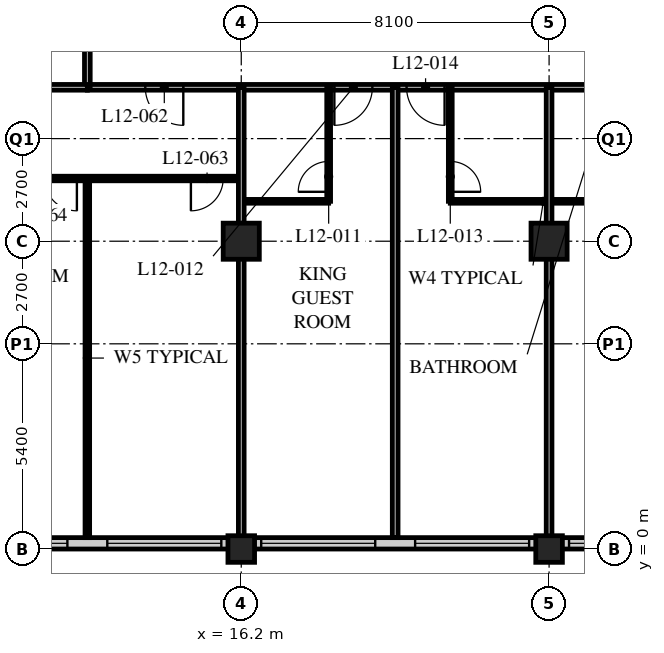
"""IFC4 building model, lengths in metres.
Left out: names, types, materials, properties, quantities, classifications, styles, units other than length and angle.
Written with IfcOpenShell. Run it as: python <this file> out.ifc"""

import sys

from ifc_helpers import new_model, si_unit, direction, frame, frame_2d, origin, origin_2d, place, context, subcontext, project, spatial, rectangle, hollow_rectangle, extrude, element, fill, save


model = new_model("IFC4")
c1 = context("Model", 3, precision=1e-05, world=origin(), true_north=direction((0.0, 1.0)))
c2 = subcontext(c1, "Body", "Model", "MODEL_VIEW")
j1 = project(units=[si_unit("LENGTHUNIT", "METRE"), si_unit("PLANEANGLEUNIT", "RADIAN")], contexts=[c1])
p1 = place(None, origin())
s1 = spatial("IfcSite", under=j1, at=p1, CompositionType="ELEMENT")
p2 = place(p1, origin())
s2 = spatial("IfcBuilding", under=s1, at=p2, CompositionType="ELEMENT")
p3 = place(p2, frame((0.0, 0.0, 53.4)))
s3 = spatial("IfcBuildingStorey", under=s2, at=p3, CompositionType="ELEMENT", Elevation=53.4)
p4 = place(p3, frame((16.2, 0.0, 0.0), z_axis=(0.0, 0.0, 1.0), x_axis=(1.0, 0.0, 0.0)))
e1 = element("IfcColumn", 1, at=p4, inside=s3, PredefinedType="COLUMN", context=c2, shape_type="SweptSolid", body=[
    extrude(hollow_rectangle(XDim=0.7, YDim=0.7, WallThickness=0.06, at=origin_2d()), origin(), (0.0, 0.0, 1.0), 3.4),
])
p5 = place(p3, frame((16.2, 8.1, 0.0), z_axis=(0.0, 0.0, 1.0), x_axis=(1.0, 0.0, 0.0)))
e2 = element("IfcColumn", 2, at=p5, inside=s3, PredefinedType="COLUMN", context=c2, shape_type="SweptSolid", body=[
    extrude(hollow_rectangle(XDim=0.95, YDim=0.95, WallThickness=0.095, at=origin_2d()), origin(), (0.0, 0.0, 1.0), 3.4),
])
p6 = place(p3, frame((24.3, 0.0, 0.0), z_axis=(0.0, 0.0, 1.0), x_axis=(1.0, 0.0, 0.0)))
e3 = element("IfcColumn", 3, at=p6, inside=s3, PredefinedType="COLUMN", context=c2, shape_type="SweptSolid", body=[
    extrude(hollow_rectangle(XDim=0.7, YDim=0.7, WallThickness=0.06, at=origin_2d()), origin(), (0.0, 0.0, 1.0), 3.4),
])
p7 = place(p3, frame((24.3, 8.1, 0.0), z_axis=(0.0, 0.0, 1.0), x_axis=(1.0, 0.0, 0.0)))
e4 = element("IfcColumn", 4, at=p7, inside=s3, PredefinedType="COLUMN", context=c2, shape_type="SweptSolid", body=[
    extrude(hollow_rectangle(XDim=0.95, YDim=0.95, WallThickness=0.095, at=origin_2d()), origin(), (0.0, 0.0, 1.0), 3.4),
])
p8 = place(p3, frame((8.4, 0.15, 0.0), z_axis=(0.0, 0.0, 1.0), x_axis=(1.0, 0.0, 0.0)))
e5 = element("IfcWall", 5, at=p8, inside=s3, PredefinedType="SOLIDWALL", context=c2, shape_type="SweptSolid", body=[
    extrude(rectangle(XDim=40.2, YDim=0.3, at=frame_2d((20.1, 0.0))), origin(), (0.0, 0.0, 1.0), 3.19),
])
p9 = place(p8, frame((0.225, 0.0, 0.9)))
e6 = element("IfcOpeningElement", 6, at=p9, cuts=e5, PredefinedType="OPENING", context=c2, shape_type="SweptSolid", body=[
    extrude(rectangle(XDim=3.0, YDim=2.0, at=frame_2d((1.5, 1.0))), frame((0.0, 0.16, 0.0), z_axis=(0.0, -1.0, 0.0), x_axis=(1.0, 0.0, 0.0)), (0.0, 0.0, 1.0), 0.32),
])
p10 = place(p8, frame((4.275, 0.0, 0.9)))
e7 = element("IfcOpeningElement", 7, at=p10, cuts=e5, PredefinedType="OPENING", context=c2, shape_type="SweptSolid", body=[
    extrude(rectangle(XDim=3.0, YDim=2.0, at=frame_2d((1.5, 1.0))), frame((0.0, 0.16, 0.0), z_axis=(0.0, -1.0, 0.0), x_axis=(1.0, 0.0, 0.0)), (0.0, 0.0, 1.0), 0.32),
])
p11 = place(p8, frame((8.325, 0.0, 0.9)))
e8 = element("IfcOpeningElement", 8, at=p11, cuts=e5, PredefinedType="OPENING", context=c2, shape_type="SweptSolid", body=[
    extrude(rectangle(XDim=3.0, YDim=2.0, at=frame_2d((1.5, 1.0))), frame((0.0, 0.16, 0.0), z_axis=(0.0, -1.0, 0.0), x_axis=(1.0, 0.0, 0.0)), (0.0, 0.0, 1.0), 0.32),
])
p12 = place(p8, frame((12.375, 0.0, 0.9)))
e9 = element("IfcOpeningElement", 9, at=p12, cuts=e5, PredefinedType="OPENING", context=c2, shape_type="SweptSolid", body=[
    extrude(rectangle(XDim=3.0, YDim=2.0, at=frame_2d((1.5, 1.0))), frame((0.0, 0.16, 0.0), z_axis=(0.0, -1.0, 0.0), x_axis=(1.0, 0.0, 0.0)), (0.0, 0.0, 1.0), 0.32),
])
p13 = place(p8, frame((16.425, 0.0, 0.9)))
e10 = element("IfcOpeningElement", 10, at=p13, cuts=e5, PredefinedType="OPENING", context=c2, shape_type="SweptSolid", body=[
    extrude(rectangle(XDim=3.0, YDim=2.0, at=frame_2d((1.5, 1.0))), frame((0.0, 0.16, 0.0), z_axis=(0.0, -1.0, 0.0), x_axis=(1.0, 0.0, 0.0)), (0.0, 0.0, 1.0), 0.32),
])
p14 = place(p8, frame((20.475, 0.0, 0.9)))
e11 = element("IfcOpeningElement", 11, at=p14, cuts=e5, PredefinedType="OPENING", context=c2, shape_type="SweptSolid", body=[
    extrude(rectangle(XDim=3.0, YDim=2.0, at=frame_2d((1.5, 1.0))), frame((0.0, 0.16, 0.0), z_axis=(0.0, -1.0, 0.0), x_axis=(1.0, 0.0, 0.0)), (0.0, 0.0, 1.0), 0.32),
])
p15 = place(p8, frame((24.525, 0.0, 0.9)))
e12 = element("IfcOpeningElement", 12, at=p15, cuts=e5, PredefinedType="OPENING", context=c2, shape_type="SweptSolid", body=[
    extrude(rectangle(XDim=3.0, YDim=2.0, at=frame_2d((1.5, 1.0))), frame((0.0, 0.16, 0.0), z_axis=(0.0, -1.0, 0.0), x_axis=(1.0, 0.0, 0.0)), (0.0, 0.0, 1.0), 0.32),
])
p16 = place(p8, frame((28.575, 0.0, 0.9)))
e13 = element("IfcOpeningElement", 13, at=p16, cuts=e5, PredefinedType="OPENING", context=c2, shape_type="SweptSolid", body=[
    extrude(rectangle(XDim=3.0, YDim=2.0, at=frame_2d((1.5, 1.0))), frame((0.0, 0.16, 0.0), z_axis=(0.0, -1.0, 0.0), x_axis=(1.0, 0.0, 0.0)), (0.0, 0.0, 1.0), 0.32),
])
p17 = place(p8, frame((32.625, 0.0, 0.9)))
e14 = element("IfcOpeningElement", 14, at=p17, cuts=e5, PredefinedType="OPENING", context=c2, shape_type="SweptSolid", body=[
    extrude(rectangle(XDim=3.0, YDim=2.0, at=frame_2d((1.5, 1.0))), frame((0.0, 0.16, 0.0), z_axis=(0.0, -1.0, 0.0), x_axis=(1.0, 0.0, 0.0)), (0.0, 0.0, 1.0), 0.32),
])
p18 = place(p8, frame((36.675, 0.0, 0.9)))
e15 = element("IfcOpeningElement", 15, at=p18, cuts=e5, PredefinedType="OPENING", context=c2, shape_type="SweptSolid", body=[
    extrude(rectangle(XDim=3.0, YDim=2.0, at=frame_2d((1.5, 1.0))), frame((0.0, 0.16, 0.0), z_axis=(0.0, -1.0, 0.0), x_axis=(1.0, 0.0, 0.0)), (0.0, 0.0, 1.0), 0.32),
])
p19 = place(p3, frame((12.15, 12.15, 0.0), z_axis=(0.0, 0.0, 1.0), x_axis=(1.0, 0.0, 0.0)))
e16 = element("IfcWall", 16, at=p19, inside=s3, PredefinedType="PARTITIONING", context=c2, shape_type="SweptSolid", body=[
    extrude(rectangle(XDim=32.4, YDim=0.15, at=frame_2d((16.2, 0.0))), origin(), (0.0, 0.0, 1.0), 3.19),
])
p20 = place(p19, frame((6.5, 0.0, 0.0)))
e17 = element("IfcOpeningElement", 17, at=p20, cuts=e16, PredefinedType="OPENING", context=c2, shape_type="SweptSolid", body=[
    extrude(rectangle(XDim=1.0, YDim=2.1, at=frame_2d((0.5, 1.05))), frame((0.0, 0.085, 0.0), z_axis=(0.0, -1.0, 0.0), x_axis=(1.0, 0.0, 0.0)), (0.0, 0.0, 1.0), 0.17),
])
p21 = place(p19, frame((8.4, 0.0, 0.0)))
e18 = element("IfcOpeningElement", 18, at=p21, cuts=e16, PredefinedType="OPENING", context=c2, shape_type="SweptSolid", body=[
    extrude(rectangle(XDim=1.0, YDim=2.1, at=frame_2d((0.5, 1.05))), frame((0.0, 0.085, 0.0), z_axis=(0.0, -1.0, 0.0), x_axis=(1.0, 0.0, 0.0)), (0.0, 0.0, 1.0), 0.17),
])
p22 = place(p19, frame((14.6, 0.0, 0.0)))
e19 = element("IfcOpeningElement", 19, at=p22, cuts=e16, PredefinedType="OPENING", context=c2, shape_type="SweptSolid", body=[
    extrude(rectangle(XDim=1.0, YDim=2.1, at=frame_2d((0.5, 1.05))), frame((0.0, 0.085, 0.0), z_axis=(0.0, -1.0, 0.0), x_axis=(1.0, 0.0, 0.0)), (0.0, 0.0, 1.0), 0.17),
])
p23 = place(p19, frame((18.65, 0.0, 0.0)))
e20 = element("IfcOpeningElement", 20, at=p23, cuts=e16, PredefinedType="OPENING", context=c2, shape_type="SweptSolid", body=[
    extrude(rectangle(XDim=1.0, YDim=2.1, at=frame_2d((0.5, 1.05))), frame((0.0, 0.085, 0.0), z_axis=(0.0, -1.0, 0.0), x_axis=(1.0, 0.0, 0.0)), (0.0, 0.0, 1.0), 0.17),
])
p24 = place(p19, frame((20.55, 0.0, 0.0)))
e21 = element("IfcOpeningElement", 21, at=p24, cuts=e16, PredefinedType="OPENING", context=c2, shape_type="SweptSolid", body=[
    extrude(rectangle(XDim=1.0, YDim=2.1, at=frame_2d((0.5, 1.05))), frame((0.0, 0.085, 0.0), z_axis=(0.0, -1.0, 0.0), x_axis=(1.0, 0.0, 0.0)), (0.0, 0.0, 1.0), 0.17),
])
p25 = place(p19, frame((26.75, 0.0, 0.0)))
e22 = element("IfcOpeningElement", 22, at=p25, cuts=e16, PredefinedType="OPENING", context=c2, shape_type="SweptSolid", body=[
    extrude(rectangle(XDim=1.0, YDim=2.1, at=frame_2d((0.5, 1.05))), frame((0.0, 0.085, 0.0), z_axis=(0.0, -1.0, 0.0), x_axis=(1.0, 0.0, 0.0)), (0.0, 0.0, 1.0), 0.17),
])
p26 = place(p19, frame((1.525, 0.0, 0.0)))
e23 = element("IfcOpeningElement", 23, at=p26, cuts=e16, PredefinedType="OPENING", context=c2, shape_type="SweptSolid", body=[
    extrude(rectangle(XDim=1.0, YDim=2.1, at=frame_2d((0.5, 1.05))), frame((0.0, 0.085, 0.0), z_axis=(0.0, -1.0, 0.0), x_axis=(1.0, 0.0, 0.0)), (0.0, 0.0, 1.0), 0.17),
])
p27 = place(p19, frame((29.875, 0.0, 0.0)))
e24 = element("IfcOpeningElement", 24, at=p27, cuts=e16, PredefinedType="OPENING", context=c2, shape_type="SweptSolid", body=[
    extrude(rectangle(XDim=1.0, YDim=2.1, at=frame_2d((0.5, 1.05))), frame((0.0, 0.085, 0.0), z_axis=(0.0, -1.0, 0.0), x_axis=(1.0, 0.0, 0.0)), (0.0, 0.0, 1.0), 0.17),
])
p28 = place(p3, frame((12.15, 12.15, 0.0), z_axis=(0.0, 0.0, 1.0), x_axis=(0.0, 1.0, 0.0)))
e25 = element("IfcWall", 25, at=p28, inside=s3, PredefinedType="PARTITIONING", context=c2, shape_type="SweptSolid", body=[
    extrude(rectangle(XDim=30.15, YDim=0.15, at=frame_2d((15.075, 0.0))), origin(), (0.0, 0.0, 1.0), 3.19),
])
p29 = place(p28, frame((2.45, 0.0, 0.0)))
e26 = element("IfcOpeningElement", 26, at=p29, cuts=e25, PredefinedType="OPENING", context=c2, shape_type="SweptSolid", body=[
    extrude(rectangle(XDim=1.0, YDim=2.1, at=frame_2d((0.5, 1.05))), frame((0.0, 0.085, 0.0), z_axis=(0.0, -1.0, 0.0), x_axis=(1.0, 0.0, 0.0)), (0.0, 0.0, 1.0), 0.17),
])
p30 = place(p28, frame((6.5, 0.0, 0.0)))
e27 = element("IfcOpeningElement", 27, at=p30, cuts=e25, PredefinedType="OPENING", context=c2, shape_type="SweptSolid", body=[
    extrude(rectangle(XDim=1.0, YDim=2.1, at=frame_2d((0.5, 1.05))), frame((0.0, 0.085, 0.0), z_axis=(0.0, -1.0, 0.0), x_axis=(1.0, 0.0, 0.0)), (0.0, 0.0, 1.0), 0.17),
])
p31 = place(p28, frame((10.55, 0.0, 0.0)))
e28 = element("IfcOpeningElement", 28, at=p31, cuts=e25, PredefinedType="OPENING", context=c2, shape_type="SweptSolid", body=[
    extrude(rectangle(XDim=1.0, YDim=2.1, at=frame_2d((0.5, 1.05))), frame((0.0, 0.085, 0.0), z_axis=(0.0, -1.0, 0.0), x_axis=(1.0, 0.0, 0.0)), (0.0, 0.0, 1.0), 0.17),
])
p32 = place(p28, frame((14.6, 0.0, 0.0)))
e29 = element("IfcOpeningElement", 29, at=p32, cuts=e25, PredefinedType="OPENING", context=c2, shape_type="SweptSolid", body=[
    extrude(rectangle(XDim=1.0, YDim=2.1, at=frame_2d((0.5, 1.05))), frame((0.0, 0.085, 0.0), z_axis=(0.0, -1.0, 0.0), x_axis=(1.0, 0.0, 0.0)), (0.0, 0.0, 1.0), 0.17),
])
p33 = place(p28, frame((21.65, 0.0, 0.0)))
e30 = element("IfcOpeningElement", 30, at=p33, cuts=e25, PredefinedType="OPENING", context=c2, shape_type="SweptSolid", body=[
    extrude(rectangle(XDim=1.0, YDim=2.1, at=frame_2d((0.5, 1.05))), frame((0.0, 0.085, 0.0), z_axis=(0.0, -1.0, 0.0), x_axis=(1.0, 0.0, 0.0)), (0.0, 0.0, 1.0), 0.17),
])
p34 = place(p28, frame((26.7, 0.0, 0.0)))
e31 = element("IfcOpeningElement", 31, at=p34, cuts=e25, PredefinedType="OPENING", context=c2, shape_type="SweptSolid", body=[
    extrude(rectangle(XDim=1.0, YDim=2.1, at=frame_2d((0.5, 1.05))), frame((0.0, 0.085, 0.0), z_axis=(0.0, -1.0, 0.0), x_axis=(1.0, 0.0, 0.0)), (0.0, 0.0, 1.0), 0.17),
])
p35 = place(p3, frame((16.2, 9.15, 0.0), z_axis=(0.0, 0.0, 1.0), x_axis=(1.0, 0.0, 0.0)))
e32 = element("IfcWall", 32, at=p35, inside=s3, PredefinedType="PARTITIONING", context=c2, shape_type="SweptSolid", body=[
    extrude(rectangle(XDim=2.3, YDim=0.1, at=frame_2d((1.15, 0.0))), origin(), (0.0, 0.0, 1.0), 3.19),
])
p36 = place(p3, frame((18.5, 12.15, 0.0), z_axis=(0.0, 0.0, 1.0), x_axis=(0.0, -1.0, 0.0)))
e33 = element("IfcWall", 33, at=p36, inside=s3, PredefinedType="PARTITIONING", context=c2, shape_type="SweptSolid", body=[
    extrude(rectangle(XDim=3.0, YDim=0.1, at=frame_2d((1.5, 0.0))), origin(), (0.0, 0.0, 1.0), 3.19),
])
p37 = place(p36, frame((1.95, 0.0, 0.0)))
e34 = element("IfcOpeningElement", 34, at=p37, cuts=e33, PredefinedType="OPENING", context=c2, shape_type="SweptSolid", body=[
    extrude(rectangle(XDim=0.8, YDim=2.1, at=frame_2d((0.4, 1.05))), frame((0.0, 0.06, 0.0), z_axis=(0.0, -1.0, 0.0), x_axis=(1.0, 0.0, 0.0)), (0.0, 0.0, 1.0), 0.12),
])
p38 = place(p3, frame((20.25, 12.15, 0.0), z_axis=(0.0, 0.0, 1.0), x_axis=(0.0, -1.0, 0.0)))
e35 = element("IfcWall", 35, at=p38, inside=s3, PredefinedType="PARTITIONING", context=c2, shape_type="SweptSolid", body=[
    extrude(rectangle(XDim=11.85, YDim=0.15, at=frame_2d((5.925, 0.0))), origin(), (0.0, 0.0, 1.0), 3.19),
])
p39 = place(p3, frame((21.7, 9.15, 0.0), z_axis=(0.0, 0.0, 1.0), x_axis=(1.0, 0.0, 0.0)))
e36 = element("IfcWall", 36, at=p39, inside=s3, PredefinedType="PARTITIONING", context=c2, shape_type="SweptSolid", body=[
    extrude(rectangle(XDim=4.9, YDim=0.1, at=frame_2d((2.45, 0.0))), origin(), (0.0, 0.0, 1.0), 3.19),
])
p40 = place(p3, frame((21.7, 12.15, 0.0), z_axis=(0.0, 0.0, 1.0), x_axis=(0.0, -1.0, 0.0)))
e37 = element("IfcWall", 37, at=p40, inside=s3, PredefinedType="PARTITIONING", context=c2, shape_type="SweptSolid", body=[
    extrude(rectangle(XDim=3.0, YDim=0.1, at=frame_2d((1.5, 0.0))), origin(), (0.0, 0.0, 1.0), 3.19),
])
p41 = place(p40, frame((1.95, 0.0, 0.0)))
e38 = element("IfcOpeningElement", 38, at=p41, cuts=e37, PredefinedType="OPENING", context=c2, shape_type="SweptSolid", body=[
    extrude(rectangle(XDim=0.8, YDim=2.1, at=frame_2d((0.4, 1.05))), frame((0.0, 0.06, 0.0), z_axis=(0.0, -1.0, 0.0), x_axis=(1.0, 0.0, 0.0)), (0.0, 0.0, 1.0), 0.12),
])
p42 = place(p3, frame((24.3, 12.15, 0.0), z_axis=(0.0, 0.0, 1.0), x_axis=(0.0, -1.0, 0.0)))
e39 = element("IfcWall", 39, at=p42, inside=s3, PredefinedType="PARTITIONING", context=c2, shape_type="SweptSolid", body=[
    extrude(rectangle(XDim=11.85, YDim=0.15, at=frame_2d((5.925, 0.0))), origin(), (0.0, 0.0, 1.0), 2.578),
])
p43 = place(p3, frame((8.15, 9.75, 0.0), z_axis=(0.0, 0.0, 1.0), x_axis=(1.0, 0.0, 0.0)))
e40 = element("IfcWall", 40, at=p43, inside=s3, PredefinedType="PARTITIONING", context=c2, shape_type="SweptSolid", body=[
    extrude(rectangle(XDim=8.05, YDim=0.12, at=frame_2d((4.025, 0.0))), origin(), (0.0, 0.0, 1.0), 3.19),
])
p44 = place(p43, frame((6.725, 0.0, 0.0)))
e41 = element("IfcOpeningElement", 41, at=p44, cuts=e40, PredefinedType="OPENING", context=c2, shape_type="SweptSolid", body=[
    extrude(rectangle(XDim=0.85, YDim=2.1, at=frame_2d((0.425, 1.05))), frame((0.0, 0.07, 0.0), z_axis=(0.0, -1.0, 0.0), x_axis=(1.0, 0.0, 0.0)), (0.0, 0.0, 1.0), 0.14),
])
p45 = place(p43, frame((2.875, 0.0, 0.0)))
e42 = element("IfcOpeningElement", 42, at=p45, cuts=e40, PredefinedType="OPENING", context=c2, shape_type="SweptSolid", body=[
    extrude(rectangle(XDim=0.85, YDim=2.1, at=frame_2d((0.425, 1.05))), frame((0.0, 0.07, 0.0), z_axis=(0.0, -1.0, 0.0), x_axis=(1.0, 0.0, 0.0)), (0.0, 0.0, 1.0), 0.14),
])
p46 = place(p3, frame((12.15, 9.75, 0.0), z_axis=(0.0, 0.0, 1.0), x_axis=(0.0, -1.0, 0.0)))
e43 = element("IfcWall", 43, at=p46, inside=s3, PredefinedType="PARTITIONING", context=c2, shape_type="SweptSolid", body=[
    extrude(rectangle(XDim=9.45, YDim=0.12, at=frame_2d((4.725, 0.0))), origin(), (0.0, 0.0, 1.0), 3.19),
])
p47 = place(p3, frame((0.3, 12.15, 0.0), z_axis=(0.0, 0.0, 1.0), x_axis=(1.0, 0.0, 0.0)))
e44 = element("IfcWall", 44, at=p47, inside=s3, PredefinedType="PARTITIONING", context=c2, shape_type="SweptSolid", body=[
    extrude(rectangle(XDim=11.85, YDim=0.15, at=frame_2d((5.925, 0.0))), origin(), (0.0, 0.0, 1.0), 3.19),
])
p48 = place(p3, frame((16.2, 12.15, 0.0), z_axis=(0.0, 0.0, 1.0), x_axis=(0.0, -1.0, 0.0)))
e45 = element("IfcWall", 45, at=p48, inside=s3, PredefinedType="PARTITIONING", context=c2, shape_type="SweptSolid", body=[
    extrude(rectangle(XDim=11.85, YDim=0.15, at=frame_2d((5.925, 0.0))), origin(), (0.0, 0.0, 1.0), 2.578),
])
p49 = place(p9, origin())
e46 = element("IfcWindow", 46, at=p49, inside=s3, PartitioningType="SINGLE_PANEL", PredefinedType="WINDOW", context=c2, shape_type="SweptSolid", body=[
    extrude(rectangle(XDim=3.0, YDim=2.0, at=frame_2d((1.5, 1.0))), frame((0.0, 0.03, 0.0), z_axis=(0.0, -1.0, 0.0), x_axis=(1.0, 0.0, 0.0)), (0.0, 0.0, 1.0), 0.06),
])
fill(e6, e46)
p50 = place(p10, origin())
e47 = element("IfcWindow", 47, at=p50, inside=s3, PartitioningType="SINGLE_PANEL", PredefinedType="WINDOW", context=c2, shape_type="SweptSolid", body=[
    extrude(rectangle(XDim=3.0, YDim=2.0, at=frame_2d((1.5, 1.0))), frame((0.0, 0.03, 0.0), z_axis=(0.0, -1.0, 0.0), x_axis=(1.0, 0.0, 0.0)), (0.0, 0.0, 1.0), 0.06),
])
fill(e7, e47)
p51 = place(p11, origin())
e48 = element("IfcWindow", 48, at=p51, inside=s3, PartitioningType="SINGLE_PANEL", PredefinedType="WINDOW", context=c2, shape_type="SweptSolid", body=[
    extrude(rectangle(XDim=3.0, YDim=2.0, at=frame_2d((1.5, 1.0))), frame((0.0, 0.03, 0.0), z_axis=(0.0, -1.0, 0.0), x_axis=(1.0, 0.0, 0.0)), (0.0, 0.0, 1.0), 0.06),
])
fill(e8, e48)
p52 = place(p12, origin())
e49 = element("IfcWindow", 49, at=p52, inside=s3, PartitioningType="SINGLE_PANEL", PredefinedType="WINDOW", context=c2, shape_type="SweptSolid", body=[
    extrude(rectangle(XDim=3.0, YDim=2.0, at=frame_2d((1.5, 1.0))), frame((0.0, 0.03, 0.0), z_axis=(0.0, -1.0, 0.0), x_axis=(1.0, 0.0, 0.0)), (0.0, 0.0, 1.0), 0.06),
])
fill(e9, e49)
p53 = place(p13, origin())
e50 = element("IfcWindow", 50, at=p53, inside=s3, PartitioningType="SINGLE_PANEL", PredefinedType="WINDOW", context=c2, shape_type="SweptSolid", body=[
    extrude(rectangle(XDim=3.0, YDim=2.0, at=frame_2d((1.5, 1.0))), frame((0.0, 0.03, 0.0), z_axis=(0.0, -1.0, 0.0), x_axis=(1.0, 0.0, 0.0)), (0.0, 0.0, 1.0), 0.06),
])
fill(e10, e50)
p54 = place(p37, origin())
e51 = element("IfcDoor", 51, at=p54, inside=s3, OperationType="SINGLE_SWING_LEFT", PredefinedType="DOOR", context=c2, shape_type="SweptSolid", body=[
    extrude(rectangle(XDim=0.8, YDim=2.1, at=frame_2d((0.4, 1.05))), frame((0.0, 0.025, 0.0), z_axis=(0.0, -1.0, 0.0), x_axis=(1.0, 0.0, 0.0)), (0.0, 0.0, 1.0), 0.05),
])
fill(e34, e51)
p55 = place(p20, origin())
e52 = element("IfcDoor", 52, at=p55, inside=s3, OperationType="SINGLE_SWING_RIGHT", PredefinedType="DOOR", context=c2, shape_type="SweptSolid", body=[
    extrude(rectangle(XDim=1.0, YDim=2.1, at=frame_2d((0.5, 1.05))), frame((0.0, 0.025, 0.0), z_axis=(0.0, -1.0, 0.0), x_axis=(1.0, 0.0, 0.0)), (0.0, 0.0, 1.0), 0.05),
])
fill(e17, e52)
p56 = place(p41, origin())
e53 = element("IfcDoor", 53, at=p56, inside=s3, OperationType="SINGLE_SWING_RIGHT", PredefinedType="DOOR", context=c2, shape_type="SweptSolid", body=[
    extrude(rectangle(XDim=0.8, YDim=2.1, at=frame_2d((0.4, 1.05))), frame((0.0, 0.025, 0.0), z_axis=(0.0, -1.0, 0.0), x_axis=(1.0, 0.0, 0.0)), (0.0, 0.0, 1.0), 0.05),
])
fill(e38, e53)
p57 = place(p21, origin())
e54 = element("IfcDoor", 54, at=p57, inside=s3, OperationType="SINGLE_SWING_LEFT", PredefinedType="DOOR", context=c2, shape_type="SweptSolid", body=[
    extrude(rectangle(XDim=1.0, YDim=2.1, at=frame_2d((0.5, 1.05))), frame((0.0, 0.025, 0.0), z_axis=(0.0, -1.0, 0.0), x_axis=(1.0, 0.0, 0.0)), (0.0, 0.0, 1.0), 0.05),
])
fill(e18, e54)
p58 = place(p26, origin())
e55 = element("IfcDoor", 55, at=p58, inside=s3, OperationType="SINGLE_SWING_LEFT", PredefinedType="DOOR", context=c2, shape_type="SweptSolid", body=[
    extrude(rectangle(XDim=1.0, YDim=2.1, at=frame_2d((0.5, 1.05))), frame((0.0, 0.025, 0.0), z_axis=(0.0, -1.0, 0.0), x_axis=(1.0, 0.0, 0.0)), (0.0, 0.0, 1.0), 0.05),
])
fill(e23, e55)
p59 = place(p44, origin())
e56 = element("IfcDoor", 56, at=p59, inside=s3, OperationType="SINGLE_SWING_RIGHT", PredefinedType="DOOR", context=c2, shape_type="SweptSolid", body=[
    extrude(rectangle(XDim=0.85, YDim=2.1, at=frame_2d((0.425, 1.05))), frame((0.0, 0.025, 0.0), z_axis=(0.0, -1.0, 0.0), x_axis=(1.0, 0.0, 0.0)), (0.0, 0.0, 1.0), 0.05),
])
fill(e41, e56)
p60 = place(p45, origin())
e57 = element("IfcDoor", 57, at=p60, inside=s3, OperationType="SINGLE_SWING_LEFT", PredefinedType="DOOR", context=c2, shape_type="SweptSolid", body=[
    extrude(rectangle(XDim=0.85, YDim=2.1, at=frame_2d((0.425, 1.05))), frame((0.0, 0.025, 0.0), z_axis=(0.0, -1.0, 0.0), x_axis=(1.0, 0.0, 0.0)), (0.0, 0.0, 1.0), 0.05),
])
fill(e42, e57)
save(model, sys.argv[1])
